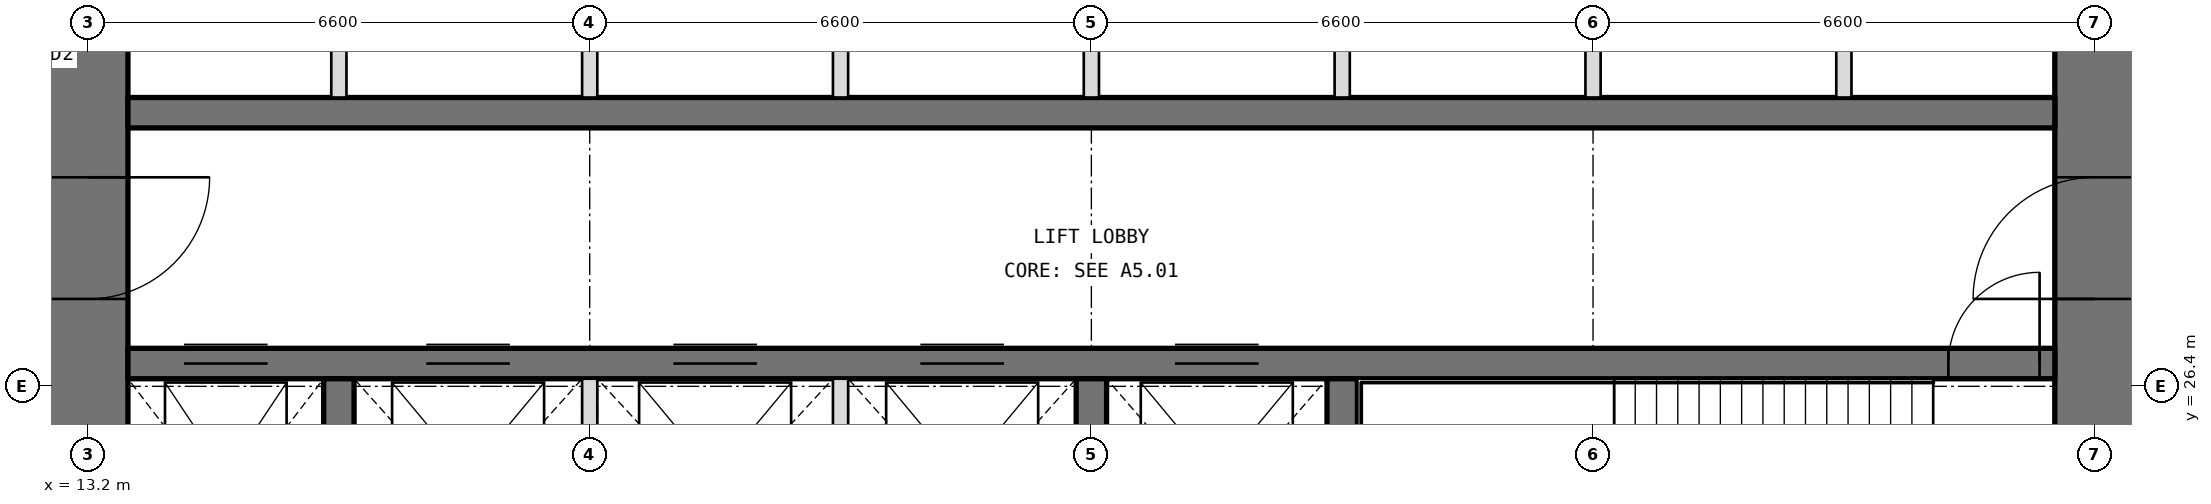
"""IFC4 building model, lengths in metres.
Left out: names, types, materials, properties, quantities, classifications, styles, units other than length and angle.
Written with IfcOpenShell. Run it as: python <this file> out.ifc"""

import sys

from ifc_helpers import new_model, si_unit, direction, frame, frame_2d, origin, place, context, subcontext, project, spatial, rectangle, extrude, element, fill, save


model = new_model("IFC4")
c1 = context("Model", 3, precision=1e-05, world=origin(), true_north=direction((0.0, 1.0)))
c2 = subcontext(c1, "Body", "Model", "MODEL_VIEW")
j1 = project(units=[si_unit("LENGTHUNIT", "METRE"), si_unit("PLANEANGLEUNIT", "RADIAN")], contexts=[c1])
p1 = place(None, origin())
s1 = spatial("IfcSite", under=j1, at=p1, CompositionType="ELEMENT")
p2 = place(p1, origin())
s2 = spatial("IfcBuilding", under=s1, at=p2, CompositionType="ELEMENT")
p3 = place(p2, frame((0.0, 0.0, -5.4)))
s3 = spatial("IfcBuildingStorey", under=s2, at=p3, CompositionType="ELEMENT", Elevation=-5.4)
p4 = place(p3, frame((39.6, 13.725, -0.15), z_axis=(0.0, 0.0, 1.0), x_axis=(0.0, 1.0, 0.0)))
e1 = element("IfcWall", 1, at=p4, inside=s3, PredefinedType="SHEAR", context=c2, shape_type="SweptSolid", body=[
    extrude(rectangle(XDim=18.75, YDim=1.05, at=frame_2d((9.375, 0.0))), origin(), (0.0, 0.0, 1.0), 5.55),
])
p5 = place(p4, frame((3.025, 0.0, 0.15)))
e2 = element("IfcOpeningElement", 2, at=p5, cuts=e1, PredefinedType="OPENING", context=c2, shape_type="SweptSolid", body=[
    extrude(rectangle(XDim=1.6, YDim=2.1, at=frame_2d((0.8, 1.05))), frame((0.0, 0.535, 0.0), z_axis=(0.0, -1.0, 0.0), x_axis=(1.0, 0.0, 0.0)), (0.0, 0.0, 1.0), 1.07),
])
p6 = place(p4, frame((13.825, 0.0, 0.15)))
e3 = element("IfcOpeningElement", 3, at=p6, cuts=e1, PredefinedType="OPENING", context=c2, shape_type="SweptSolid", body=[
    extrude(rectangle(XDim=1.6, YDim=2.1, at=frame_2d((0.8, 1.05))), frame((0.0, 0.535, 0.0), z_axis=(0.0, -1.0, 0.0), x_axis=(1.0, 0.0, 0.0)), (0.0, 0.0, 1.0), 1.07),
])
p7 = place(p3, frame((13.2, 32.475, -0.15), z_axis=(0.0, 0.0, 1.0), x_axis=(0.0, -1.0, 0.0)))
e4 = element("IfcWall", 4, at=p7, inside=s3, PredefinedType="SHEAR", context=c2, shape_type="SweptSolid", body=[
    extrude(rectangle(XDim=18.75, YDim=1.05, at=frame_2d((9.375, 0.0))), origin(), (0.0, 0.0, 1.0), 5.55),
])
p8 = place(p7, frame((14.125, 0.0, 0.15)))
e5 = element("IfcOpeningElement", 5, at=p8, cuts=e4, PredefinedType="OPENING", context=c2, shape_type="SweptSolid", body=[
    extrude(rectangle(XDim=1.6, YDim=2.1, at=frame_2d((0.8, 1.05))), frame((0.0, 0.535, 0.0), z_axis=(0.0, -1.0, 0.0), x_axis=(1.0, 0.0, 0.0)), (0.0, 0.0, 1.0), 1.07),
])
p9 = place(p7, frame((3.325, 0.0, 0.15)))
e6 = element("IfcOpeningElement", 6, at=p9, cuts=e4, PredefinedType="OPENING", context=c2, shape_type="SweptSolid", body=[
    extrude(rectangle(XDim=1.6, YDim=2.1, at=frame_2d((0.8, 1.05))), frame((0.0, 0.535, 0.0), z_axis=(0.0, -1.0, 0.0), x_axis=(1.0, 0.0, 0.0)), (0.0, 0.0, 1.0), 1.07),
])
p10 = place(p3, frame((13.725, 26.7, -0.15), z_axis=(0.0, 0.0, 1.0), x_axis=(1.0, 0.0, 0.0)))
e7 = element("IfcWall", 7, at=p10, inside=s3, PredefinedType="SHEAR", context=c2, shape_type="SweptSolid", body=[
    extrude(rectangle(XDim=25.35, YDim=0.4, at=frame_2d((12.675, 0.0))), origin(), (0.0, 0.0, 1.0), 5.55),
])
p11 = place(p10, frame((23.95, 0.0, 0.15)))
e8 = element("IfcOpeningElement", 8, at=p11, cuts=e7, PredefinedType="OPENING", context=c2, shape_type="SweptSolid", body=[
    extrude(rectangle(XDim=1.2, YDim=2.1, at=frame_2d((0.6, 1.05))), frame((0.0, 0.21, 0.0), z_axis=(0.0, -1.0, 0.0), x_axis=(1.0, 0.0, 0.0)), (0.0, 0.0, 1.0), 0.42),
])
p12 = place(p10, frame((0.738, 0.0, 0.15)))
e9 = element("IfcOpeningElement", 9, at=p12, cuts=e7, PredefinedType="OPENING", context=c2, shape_type="SweptSolid", body=[
    extrude(rectangle(XDim=1.1, YDim=2.1, at=frame_2d((0.55, 1.05))), frame((0.0, 0.21, 0.0), z_axis=(0.0, -1.0, 0.0), x_axis=(1.0, 0.0, 0.0)), (0.0, 0.0, 1.0), 0.42),
])
p13 = place(p10, frame((3.925, 0.0, 0.15)))
e10 = element("IfcOpeningElement", 10, at=p13, cuts=e7, PredefinedType="OPENING", context=c2, shape_type="SweptSolid", body=[
    extrude(rectangle(XDim=1.1, YDim=2.1, at=frame_2d((0.55, 1.05))), frame((0.0, 0.21, 0.0), z_axis=(0.0, -1.0, 0.0), x_axis=(1.0, 0.0, 0.0)), (0.0, 0.0, 1.0), 0.42),
])
p14 = place(p10, frame((7.175, 0.0, 0.15)))
e11 = element("IfcOpeningElement", 11, at=p14, cuts=e7, PredefinedType="OPENING", context=c2, shape_type="SweptSolid", body=[
    extrude(rectangle(XDim=1.1, YDim=2.1, at=frame_2d((0.55, 1.05))), frame((0.0, 0.21, 0.0), z_axis=(0.0, -1.0, 0.0), x_axis=(1.0, 0.0, 0.0)), (0.0, 0.0, 1.0), 0.42),
])
p15 = place(p10, frame((10.425, 0.0, 0.15)))
e12 = element("IfcOpeningElement", 12, at=p15, cuts=e7, PredefinedType="OPENING", context=c2, shape_type="SweptSolid", body=[
    extrude(rectangle(XDim=1.1, YDim=2.1, at=frame_2d((0.55, 1.05))), frame((0.0, 0.21, 0.0), z_axis=(0.0, -1.0, 0.0), x_axis=(1.0, 0.0, 0.0)), (0.0, 0.0, 1.0), 0.42),
])
p16 = place(p10, frame((13.775, 0.0, 0.15)))
e13 = element("IfcOpeningElement", 13, at=p16, cuts=e7, PredefinedType="OPENING", context=c2, shape_type="SweptSolid", body=[
    extrude(rectangle(XDim=1.1, YDim=2.1, at=frame_2d((0.55, 1.05))), frame((0.0, 0.21, 0.0), z_axis=(0.0, -1.0, 0.0), x_axis=(1.0, 0.0, 0.0)), (0.0, 0.0, 1.0), 0.42),
])
p17 = place(p3, frame((13.725, 30.0, -0.15), z_axis=(0.0, 0.0, 1.0), x_axis=(1.0, 0.0, 0.0)))
e14 = element("IfcWall", 14, at=p17, inside=s3, PredefinedType="SHEAR", context=c2, shape_type="SweptSolid", body=[
    extrude(rectangle(XDim=25.35, YDim=0.4, at=frame_2d((12.675, 0.0))), origin(), (0.0, 0.0, 1.0), 5.55),
])
for number, where, z_axis, x_axis in (
    (15, (16.5, 23.15, -0.15), (0.0, 0.0, 1.0), (0.0, 1.0, 0.0)),
    (16, (26.4, 23.15, -0.15), (0.0, 0.0, 1.0), (0.0, 1.0, 0.0)),
    (17, (29.7, 23.15, -0.15), (0.0, 0.0, 1.0), (0.0, 1.0, 0.0)),
):
    element("IfcWall", number, at=place(p3, frame(where, z_axis=z_axis, x_axis=x_axis)), inside=s3, PredefinedType="SHEAR", context=c2, shape_type="SweptSolid", body=[
        extrude(rectangle(XDim=3.35, YDim=0.4, at=frame_2d((1.675, 0.0))), origin(), (0.0, 0.0, 1.0), 5.55),
    ])
for number, where, z_axis, x_axis in (
    (18, (16.5, 30.2, -0.15), (0.0, 0.0, 1.0), (0.0, 1.0, 0.0)),
    (19, (19.8, 30.2, -0.15), (0.0, 0.0, 1.0), (0.0, 1.0, 0.0)),
    (20, (23.1, 30.2, -0.15), (0.0, 0.0, 1.0), (0.0, 1.0, 0.0)),
    (21, (26.4, 30.2, -0.15), (0.0, 0.0, 1.0), (0.0, 1.0, 0.0)),
    (22, (29.7, 30.2, -0.15), (0.0, 0.0, 1.0), (0.0, 1.0, 0.0)),
    (23, (33.0, 30.2, -0.15), (0.0, 0.0, 1.0), (0.0, 1.0, 0.0)),
    (24, (36.3, 30.2, -0.15), (0.0, 0.0, 1.0), (0.0, 1.0, 0.0)),
):
    element("IfcWall", number, at=place(p3, frame(where, z_axis=z_axis, x_axis=x_axis)), inside=s3, PredefinedType="PARTITIONING", context=c2, shape_type="SweptSolid", body=[
        extrude(rectangle(XDim=2.275, YDim=0.2, at=frame_2d((1.138, 0.0))), origin(), (0.0, 0.0, 1.0), 5.55),
    ])
for number, where, z_axis, x_axis in (
    (25, (19.8, 23.15, -0.15), (0.0, 0.0, 1.0), (0.0, 1.0, 0.0)),
    (26, (23.1, 23.15, -0.15), (0.0, 0.0, 1.0), (0.0, 1.0, 0.0)),
):
    element("IfcWall", number, at=place(p3, frame(where, z_axis=z_axis, x_axis=x_axis)), inside=s3, PredefinedType="PARTITIONING", context=c2, shape_type="SweptSolid", body=[
        extrude(rectangle(XDim=3.35, YDim=0.2, at=frame_2d((1.675, 0.0))), origin(), (0.0, 0.0, 1.0), 5.55),
    ])
p18 = place(p11, origin())
e27 = element("IfcDoor", 27, at=p18, inside=s3, OperationType="SINGLE_SWING_RIGHT", PredefinedType="DOOR", context=c2, shape_type="SweptSolid", body=[
    extrude(rectangle(XDim=1.2, YDim=2.1, at=frame_2d((0.6, 1.05))), frame((0.0, 0.025, 0.0), z_axis=(0.0, -1.0, 0.0), x_axis=(1.0, 0.0, 0.0)), (0.0, 0.0, 1.0), 0.05),
])
fill(e8, e27)
p19 = place(p9, origin())
e28 = element("IfcDoor", 28, at=p19, inside=s3, OperationType="DOUBLE_DOOR_DOUBLE_SWING", PredefinedType="DOOR", context=c2, shape_type="SweptSolid", body=[
    extrude(rectangle(XDim=1.6, YDim=2.1, at=frame_2d((0.8, 1.05))), frame((0.0, 0.025, 0.0), z_axis=(0.0, -1.0, 0.0), x_axis=(1.0, 0.0, 0.0)), (0.0, 0.0, 1.0), 0.05),
])
fill(e6, e28)
p20 = place(p6, origin())
e29 = element("IfcDoor", 29, at=p20, inside=s3, OperationType="DOUBLE_DOOR_DOUBLE_SWING", PredefinedType="DOOR", context=c2, shape_type="SweptSolid", body=[
    extrude(rectangle(XDim=1.6, YDim=2.1, at=frame_2d((0.8, 1.05))), frame((0.0, 0.025, 0.0), z_axis=(0.0, -1.0, 0.0), x_axis=(1.0, 0.0, 0.0)), (0.0, 0.0, 1.0), 0.05),
])
fill(e3, e29)
p21 = place(p12, origin())
e30 = element("IfcDoor", 30, at=p21, inside=s3, OperationType="DOUBLE_DOOR_SLIDING", PredefinedType="DOOR", context=c2, shape_type="SweptSolid", body=[
    extrude(rectangle(XDim=1.1, YDim=2.1, at=frame_2d((0.55, 1.05))), frame((0.0, 0.025, 0.0), z_axis=(0.0, -1.0, 0.0), x_axis=(1.0, 0.0, 0.0)), (0.0, 0.0, 1.0), 0.05),
])
fill(e9, e30)
p22 = place(p13, origin())
e31 = element("IfcDoor", 31, at=p22, inside=s3, OperationType="DOUBLE_DOOR_SLIDING", PredefinedType="DOOR", context=c2, shape_type="SweptSolid", body=[
    extrude(rectangle(XDim=1.1, YDim=2.1, at=frame_2d((0.55, 1.05))), frame((0.0, 0.025, 0.0), z_axis=(0.0, -1.0, 0.0), x_axis=(1.0, 0.0, 0.0)), (0.0, 0.0, 1.0), 0.05),
])
fill(e10, e31)
p23 = place(p14, origin())
e32 = element("IfcDoor", 32, at=p23, inside=s3, OperationType="DOUBLE_DOOR_SLIDING", PredefinedType="DOOR", context=c2, shape_type="SweptSolid", body=[
    extrude(rectangle(XDim=1.1, YDim=2.1, at=frame_2d((0.55, 1.05))), frame((0.0, 0.025, 0.0), z_axis=(0.0, -1.0, 0.0), x_axis=(1.0, 0.0, 0.0)), (0.0, 0.0, 1.0), 0.05),
])
fill(e11, e32)
p24 = place(p15, origin())
e33 = element("IfcDoor", 33, at=p24, inside=s3, OperationType="DOUBLE_DOOR_SLIDING", PredefinedType="DOOR", context=c2, shape_type="SweptSolid", body=[
    extrude(rectangle(XDim=1.1, YDim=2.1, at=frame_2d((0.55, 1.05))), frame((0.0, 0.025, 0.0), z_axis=(0.0, -1.0, 0.0), x_axis=(1.0, 0.0, 0.0)), (0.0, 0.0, 1.0), 0.05),
])
fill(e12, e33)
p25 = place(p16, origin())
e34 = element("IfcDoor", 34, at=p25, inside=s3, OperationType="DOUBLE_DOOR_SLIDING", PredefinedType="DOOR", context=c2, shape_type="SweptSolid", body=[
    extrude(rectangle(XDim=1.1, YDim=2.1, at=frame_2d((0.55, 1.05))), frame((0.0, 0.025, 0.0), z_axis=(0.0, -1.0, 0.0), x_axis=(1.0, 0.0, 0.0)), (0.0, 0.0, 1.0), 0.05),
])
fill(e13, e34)
save(model, sys.argv[1])
